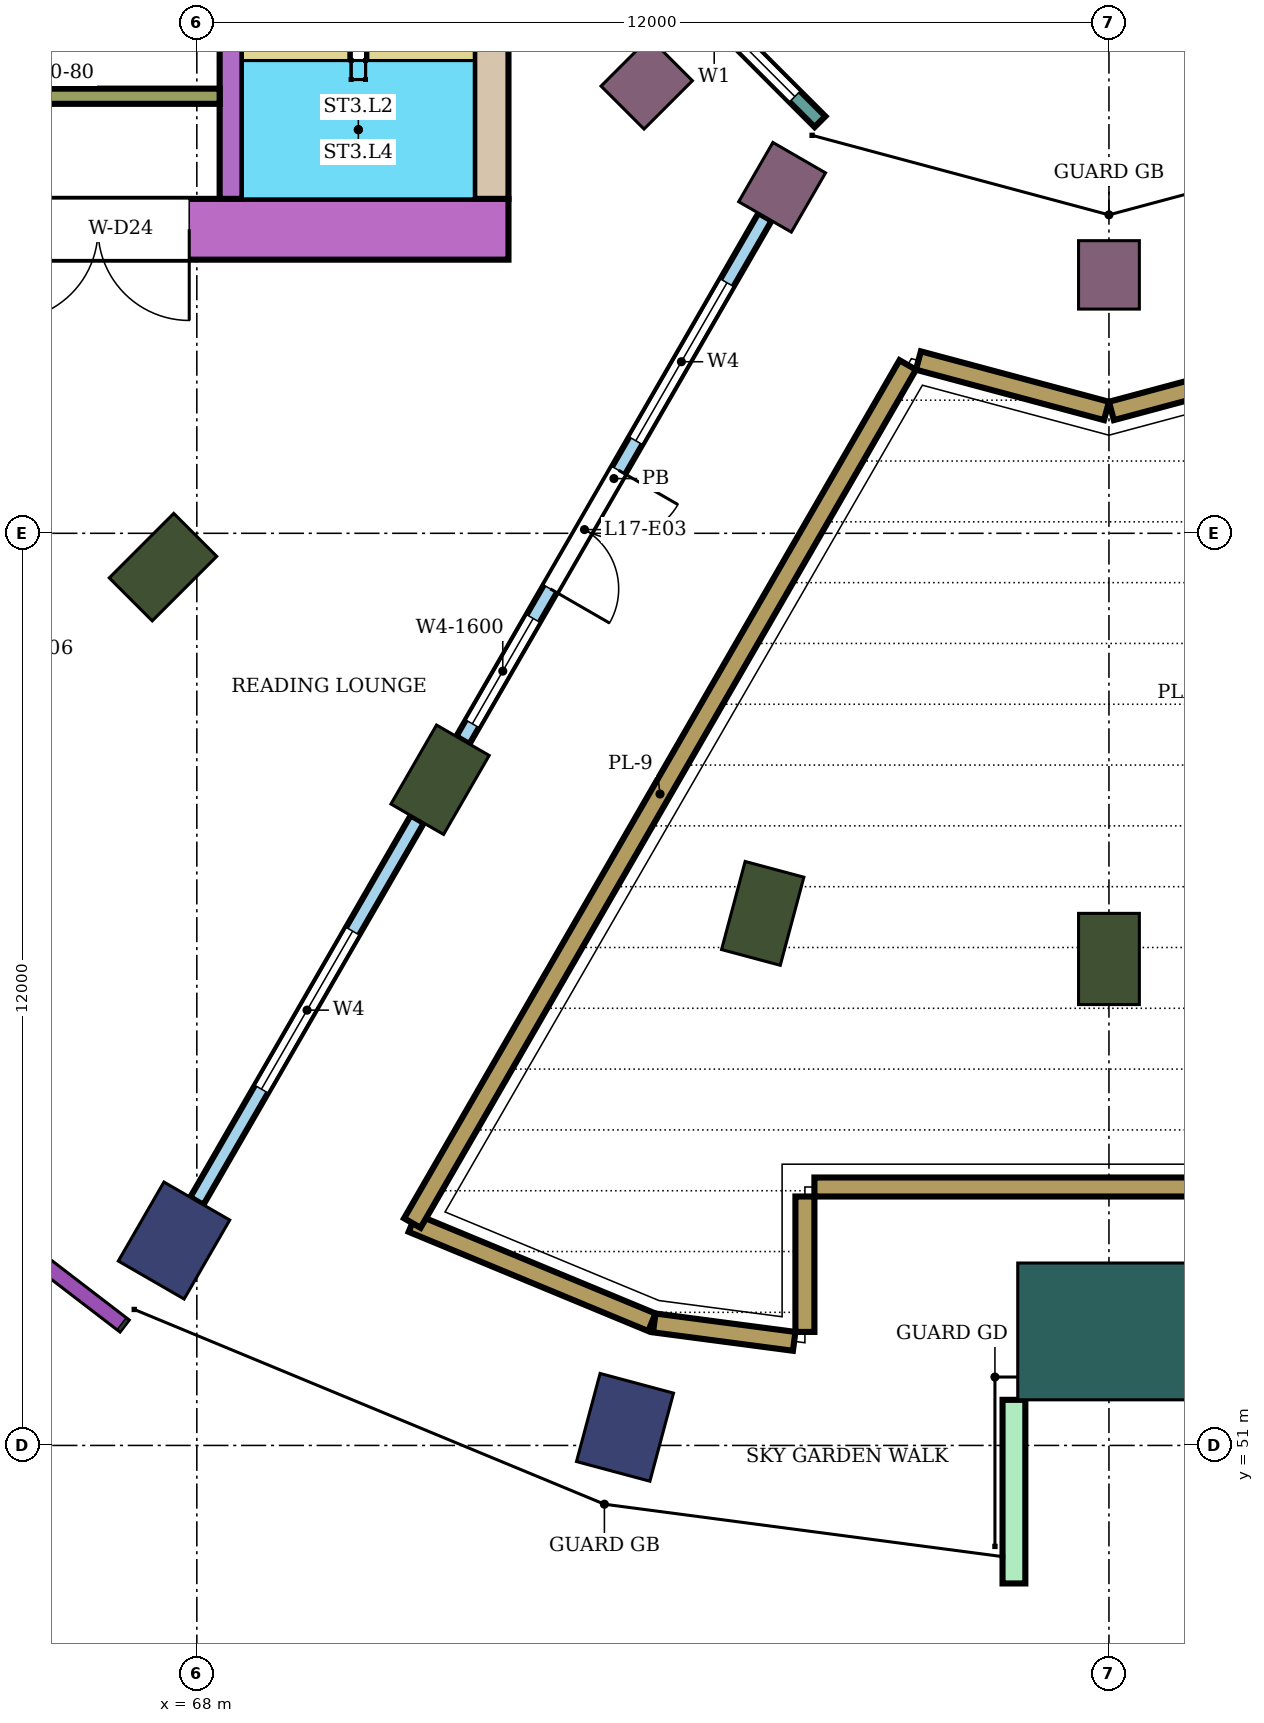
"""IFC4 building model, lengths in metres.
Left out: names, types, materials, properties, quantities, classifications, styles, units other than length and angle.
Written with IfcOpenShell. Run it as: python <this file> out.ifc"""

import sys

from ifc_helpers import new_model, si_unit, direction, frame, frame_2d, origin, origin_2d, place, context, subcontext, project, spatial, rectangle, extrude, element, fill, save


model = new_model("IFC4")
c1 = context("Model", 3, precision=1e-05, world=origin(), true_north=direction((0.0, 1.0)))
c2 = subcontext(c1, "Body", "Model", "MODEL_VIEW")
j1 = project(units=[si_unit("LENGTHUNIT", "METRE"), si_unit("PLANEANGLEUNIT", "RADIAN")], contexts=[c1])
p1 = place(None, origin())
s1 = spatial("IfcSite", under=j1, at=p1, CompositionType="ELEMENT")
p2 = place(p1, origin())
s2 = spatial("IfcBuilding", under=s1, at=p2, CompositionType="ELEMENT")
p3 = place(p2, frame((0.0, 0.0, 74.4)))
s3 = spatial("IfcBuildingStorey", under=s2, at=p3, CompositionType="ELEMENT", Elevation=74.4)
for number, where, z_axis, x_axis in (
    (1, (67.7, 53.696, 0.0), (0.0, 0.0, 1.0), (-0.5, -0.866, 0.0)),
    (2, (73.633, 51.238, 0.0), (0.0, 0.0, 1.0), (-0.259, -0.966, 0.0)),
):
    element("IfcColumn", number, at=place(p3, frame(where, z_axis=z_axis, x_axis=x_axis)), inside=s3, PredefinedType="COLUMN", context=c2, shape_type="SweptSolid", body=[
        extrude(rectangle(XDim=1.2, YDim=1.0, at=origin_2d()), origin(), (0.0, 0.0, 1.0), 8.0),
    ])
for number, where, z_axis, x_axis in (
    (3, (67.555, 62.555, 0.0), (0.0, 0.0, 1.0), (-0.707, -0.707, 0.0)),
    (4, (71.2, 59.758, 0.0), (0.0, 0.0, 1.0), (-0.5, -0.866, 0.0)),
    (5, (75.445, 58.0, 0.0), (0.0, 0.0, 1.0), (-0.259, -0.966, 0.0)),
    (6, (80.0, 57.4, 0.0), (0.0, 0.0, 1.0), (0.0, -1.0, 0.0)),
):
    element("IfcColumn", number, at=place(p3, frame(where, z_axis=z_axis, x_axis=x_axis)), inside=s3, PredefinedType="COLUMN", context=c2, shape_type="SweptSolid", body=[
        extrude(rectangle(XDim=1.2, YDim=0.8, at=origin_2d()), origin(), (0.0, 0.0, 1.0), 8.0),
    ])
for number, where, z_axis, x_axis in (
    (7, (73.919, 68.919, 0.0), (0.0, 0.0, 1.0), (-0.707, -0.707, 0.0)),
    (8, (75.7, 67.552, 0.0), (0.0, 0.0, 1.0), (-0.5, -0.866, 0.0)),
    (9, (80.0, 66.4, 0.0), (0.0, 0.0, 1.0), (0.0, -1.0, 0.0)),
):
    element("IfcColumn", number, at=place(p3, frame(where, z_axis=z_axis, x_axis=x_axis)), inside=s3, PredefinedType="COLUMN", context=c2, shape_type="SweptSolid", body=[
        extrude(rectangle(XDim=0.9, YDim=0.8, at=origin_2d()), origin(), (0.0, 0.0, 1.0), 8.0),
    ])
p4 = place(p3, frame((80.0, 52.5, 0.0), z_axis=(0.0, 0.0, 1.0), x_axis=(0.0, -1.0, 0.0)))
e10 = element("IfcColumn", 10, at=p4, inside=s3, PredefinedType="COLUMN", context=c2, shape_type="SweptSolid", body=[
    extrude(rectangle(XDim=1.8, YDim=2.4, at=origin_2d()), origin(), (0.0, 0.0, 1.0), 8.0),
])
p5 = place(p3, frame((72.1, 67.0, 0.0), z_axis=(0.0, 0.0, 1.0), x_axis=(-1.0, 0.0, 0.0)))
e11 = element("IfcWall", 11, at=p5, inside=s3, PredefinedType="SHEAR", context=c2, shape_type="SweptSolid", body=[
    extrude(rectangle(XDim=14.7, YDim=0.8, at=frame_2d((7.35, 0.0))), origin(), (0.0, 0.0, 1.0), 7.68),
])
p6 = place(p5, frame((4.2, 0.0, 0.0)))
e12 = element("IfcOpeningElement", 12, at=p6, cuts=e11, PredefinedType="OPENING", context=c2, shape_type="SweptSolid", body=[
    extrude(rectangle(XDim=2.4, YDim=2.4, at=frame_2d((1.2, 1.2))), frame((0.0, 0.41, 0.0), z_axis=(0.0, -1.0, 0.0), x_axis=(1.0, 0.0, 0.0)), (0.0, 0.0, 1.0), 0.82),
])
p7 = place(p3, frame((71.875, 75.0, 0.0), z_axis=(0.0, 0.0, 1.0), x_axis=(0.0, -1.0, 0.0)))
e13 = element("IfcWall", 13, at=p7, inside=s3, PredefinedType="SHEAR", context=c2, shape_type="SweptSolid", body=[
    extrude(rectangle(XDim=7.6, YDim=0.45, at=frame_2d((3.8, 0.0))), origin(), (0.0, 0.0, 1.0), 7.68),
])
p8 = place(p3, frame((68.45, 75.0, 0.0), z_axis=(0.0, 0.0, 1.0), x_axis=(0.0, -1.0, 0.0)))
e14 = element("IfcWall", 14, at=p8, inside=s3, PredefinedType="SHEAR", context=c2, shape_type="SweptSolid", body=[
    extrude(rectangle(XDim=7.6, YDim=0.3, at=frame_2d((3.8, 0.0))), origin(), (0.0, 0.0, 1.0), 7.68),
])
p9 = place(p8, frame((1.85, 0.0, 0.0)))
e15 = element("IfcOpeningElement", 15, at=p9, cuts=e14, PredefinedType="OPENING", context=c2, shape_type="SweptSolid", body=[
    extrude(rectangle(XDim=0.9, YDim=2.1, at=frame_2d((0.45, 1.05))), frame((0.0, 0.16, 0.0), z_axis=(0.0, -1.0, 0.0), x_axis=(1.0, 0.0, 0.0)), (0.0, 0.0, 1.0), 0.32),
])
p10 = place(p3, frame((68.3, 68.75, 0.0), z_axis=(0.0, 0.0, 1.0), x_axis=(-1.0, 0.0, 0.0)))
e16 = element("IfcWall", 16, at=p10, inside=s3, PredefinedType="SHEAR", context=c2, shape_type="SweptSolid", body=[
    extrude(rectangle(XDim=4.65, YDim=0.2, at=frame_2d((2.325, 0.0))), origin(), (0.0, 0.0, 1.0), 7.68),
])
p11 = place(p3, frame((78.75, 51.6, 0.0), z_axis=(0.0, 0.0, 1.0), x_axis=(0.0, -1.0, 0.0)))
e17 = element("IfcWall", 17, at=p11, inside=s3, PredefinedType="NOTDEFINED", context=c2, shape_type="SweptSolid", body=[
    extrude(rectangle(XDim=2.416, YDim=0.3, at=frame_2d((1.208, 0.0))), origin(), (0.0, 0.0, 1.0), 8.0),
])
p12 = place(p3, frame((73.415, 71.198, 0.0), z_axis=(0.0, 0.0, 1.0), x_axis=(0.707106781187, -0.707106781187, 0.0)))
e18 = element("IfcWall", 18, at=p12, inside=s3, PredefinedType="NOTDEFINED", context=c2, shape_type="SweptSolid", body=[
    extrude(rectangle(XDim=3.936, YDim=0.2, at=frame_2d((1.968, 0.0))), origin(), (0.0, 0.0, 1.0), 8.0),
])
p13 = place(p12, frame((0.468, 0.0, 0.9)))
e19 = element("IfcOpeningElement", 19, at=p13, cuts=e18, PredefinedType="OPENING", context=c2, shape_type="SweptSolid", body=[
    extrude(rectangle(XDim=3.0, YDim=2.3, at=frame_2d((1.5, 1.15))), frame((0.0, 0.11, 0.0), z_axis=(0.0, -1.0, 0.0), x_axis=(1.0, 0.0, 0.0)), (0.0, 0.0, 1.0), 0.22),
])
p14 = place(p3, frame((70.835, 53.926, 0.0), z_axis=(0.0, 0.0, 1.0), x_axis=(0.923871147788, -0.38270367425, 0.0)))
e20 = element("IfcWall", 20, at=p14, inside=s3, PredefinedType="USERDEFINED", context=c2, shape_type="SweptSolid", body=[
    extrude(rectangle(XDim=3.411, YDim=0.25, at=frame_2d((1.706, 0.0))), origin(), (0.0, 0.0, 1.0), 0.6),
])
p15 = place(p3, frame((74.018, 52.612, 0.0), z_axis=(0.0, 0.0, 1.0), x_axis=(0.991436829887, -0.130587182926, 0.0)))
e21 = element("IfcWall", 21, at=p15, inside=s3, PredefinedType="USERDEFINED", context=c2, shape_type="SweptSolid", body=[
    extrude(rectangle(XDim=1.856, YDim=0.25, at=frame_2d((0.928, 0.0))), origin(), (0.0, 0.0, 1.0), 0.6),
])
p16 = place(p3, frame((76.0, 52.493, 0.0), z_axis=(0.0, 0.0, 1.0), x_axis=(0.0, 1.0, 0.0)))
e22 = element("IfcWall", 22, at=p16, inside=s3, PredefinedType="USERDEFINED", context=c2, shape_type="SweptSolid", body=[
    extrude(rectangle(XDim=1.781, YDim=0.25, at=frame_2d((0.891, 0.0))), origin(), (0.0, 0.0, 1.0), 0.6),
])
p17 = place(p3, frame((76.125, 54.4, 0.0), z_axis=(0.0, 0.0, 1.0), x_axis=(1.0, 0.0, 0.0)))
e23 = element("IfcWall", 23, at=p17, inside=s3, PredefinedType="USERDEFINED", context=c2, shape_type="SweptSolid", body=[
    extrude(rectangle(XDim=7.75, YDim=0.25, at=frame_2d((3.875, 0.0))), origin(), (0.0, 0.0, 1.0), 0.6),
])
for number, where, z_axis, x_axis in (
    (24, (82.507, 65.273, 0.0), (0.0, 0.0, 1.0), (-0.966, -0.259, 0.0)),
    (25, (79.968, 64.61, 0.0), (0.0, 0.0, 1.0), (-0.966, 0.259, 0.0)),
):
    element("IfcWall", number, at=place(p3, frame(where, z_axis=z_axis, x_axis=x_axis)), inside=s3, PredefinedType="USERDEFINED", context=c2, shape_type="SweptSolid", body=[
        extrude(rectangle(XDim=2.562, YDim=0.25, at=frame_2d((1.281, 0.0))), origin(), (0.0, 0.0, 1.0), 0.6),
    ])
p18 = place(p3, frame((77.353, 65.215, 0.0), z_axis=(0.0, 0.0, 1.0), x_axis=(-0.499990498062, -0.866030889661, 0.0)))
e26 = element("IfcWall", 26, at=p18, inside=s3, PredefinedType="USERDEFINED", context=c2, shape_type="SweptSolid", body=[
    extrude(rectangle(XDim=13.035, YDim=0.25, at=frame_2d((6.518, 0.0))), origin(), (0.0, 0.0, 1.0), 0.6),
])
p19 = place(p3, frame((75.475, 67.162, 0.0), z_axis=(0.0, 0.0, 1.0), x_axis=(-0.50001663867, -0.86601579723, 0.0)))
e27 = element("IfcWall", 27, at=p19, inside=s3, PredefinedType="NOTDEFINED", context=c2, shape_type="SweptSolid", body=[
    extrude(rectangle(XDim=7.95, YDim=0.2, at=frame_2d((3.975, 0.0))), origin(), (0.0, 0.0, 1.0), 8.0),
])
p20 = place(p19, frame((1.0, 0.0, 0.3)))
e28 = element("IfcOpeningElement", 28, at=p20, cuts=e27, PredefinedType="OPENING", context=c2, shape_type="SweptSolid", body=[
    extrude(rectangle(XDim=2.4, YDim=3.6, at=frame_2d((1.2, 1.8))), frame((0.0, 0.11, 0.0), z_axis=(0.0, -1.0, 0.0), x_axis=(1.0, 0.0, 0.0)), (0.0, 0.0, 1.0), 0.22),
])
p21 = place(p19, frame((3.85, 0.0, 0.0)))
e29 = element("IfcOpeningElement", 29, at=p21, cuts=e27, PredefinedType="OPENING", context=c2, shape_type="SweptSolid", body=[
    extrude(rectangle(XDim=1.8, YDim=2.4, at=frame_2d((0.9, 1.2))), frame((0.0, 0.11, 0.0), z_axis=(0.0, -1.0, 0.0), x_axis=(1.0, 0.0, 0.0)), (0.0, 0.0, 1.0), 0.22),
])
p22 = place(p19, frame((6.1, 0.0, 0.3)))
e30 = element("IfcOpeningElement", 30, at=p22, cuts=e27, PredefinedType="OPENING", context=c2, shape_type="SweptSolid", body=[
    extrude(rectangle(XDim=1.6, YDim=3.6, at=frame_2d((0.8, 1.8))), frame((0.0, 0.11, 0.0), z_axis=(0.0, -1.0, 0.0), x_axis=(1.0, 0.0, 0.0)), (0.0, 0.0, 1.0), 0.22),
])
p23 = place(p3, frame((70.9, 59.238, 0.0), z_axis=(0.0, 0.0, 1.0), x_axis=(-0.499987231761, -0.866032775405, 0.0)))
e31 = element("IfcWall", 31, at=p23, inside=s3, PredefinedType="NOTDEFINED", context=c2, shape_type="SweptSolid", body=[
    extrude(rectangle(XDim=5.8, YDim=0.2, at=frame_2d((2.9, 0.0))), origin(), (0.0, 0.0, 1.0), 8.0),
])
p24 = place(p23, frame((1.7, 0.0, 0.3)))
e32 = element("IfcOpeningElement", 32, at=p24, cuts=e31, PredefinedType="OPENING", context=c2, shape_type="SweptSolid", body=[
    extrude(rectangle(XDim=2.4, YDim=3.6, at=frame_2d((1.2, 1.8))), frame((0.0, 0.11, 0.0), z_axis=(0.0, -1.0, 0.0), x_axis=(1.0, 0.0, 0.0)), (0.0, 0.0, 1.0), 0.22),
])
p25 = place(p13, origin())
e33 = element("IfcWindow", 33, at=p25, inside=s3, PartitioningType="SINGLE_PANEL", PredefinedType="WINDOW", context=c2, shape_type="SweptSolid", body=[
    extrude(rectangle(XDim=3.0, YDim=2.3, at=frame_2d((1.5, 1.15))), frame((0.0, 0.03, 0.0), z_axis=(0.0, -1.0, 0.0), x_axis=(1.0, 0.0, 0.0)), (0.0, 0.0, 1.0), 0.06),
])
fill(e19, e33)
p26 = place(p20, origin())
e34 = element("IfcWindow", 34, at=p26, inside=s3, PartitioningType="SINGLE_PANEL", PredefinedType="WINDOW", context=c2, shape_type="SweptSolid", body=[
    extrude(rectangle(XDim=2.4, YDim=3.6, at=frame_2d((1.2, 1.8))), frame((0.0, 0.03, 0.0), z_axis=(0.0, -1.0, 0.0), x_axis=(1.0, 0.0, 0.0)), (0.0, 0.0, 1.0), 0.06),
])
fill(e28, e34)
p27 = place(p21, origin())
e35 = element("IfcDoor", 35, at=p27, inside=s3, OperationType="DOUBLE_DOOR_SINGLE_SWING", PredefinedType="DOOR", context=c2, shape_type="SweptSolid", body=[
    extrude(rectangle(XDim=1.8, YDim=2.4, at=frame_2d((0.9, 1.2))), frame((0.0, 0.025, 0.0), z_axis=(0.0, -1.0, 0.0), x_axis=(1.0, 0.0, 0.0)), (0.0, 0.0, 1.0), 0.05),
])
fill(e29, e35)
p28 = place(p22, origin())
e36 = element("IfcWindow", 36, at=p28, inside=s3, PartitioningType="SINGLE_PANEL", PredefinedType="WINDOW", context=c2, shape_type="SweptSolid", body=[
    extrude(rectangle(XDim=1.6, YDim=3.6, at=frame_2d((0.8, 1.8))), frame((0.0, 0.03, 0.0), z_axis=(0.0, -1.0, 0.0), x_axis=(1.0, 0.0, 0.0)), (0.0, 0.0, 1.0), 0.06),
])
fill(e30, e36)
p29 = place(p24, origin())
e37 = element("IfcWindow", 37, at=p29, inside=s3, PartitioningType="SINGLE_PANEL", PredefinedType="WINDOW", context=c2, shape_type="SweptSolid", body=[
    extrude(rectangle(XDim=2.4, YDim=3.6, at=frame_2d((1.2, 1.8))), frame((0.0, 0.03, 0.0), z_axis=(0.0, -1.0, 0.0), x_axis=(1.0, 0.0, 0.0)), (0.0, 0.0, 1.0), 0.06),
])
fill(e32, e37)
p30 = place(p6, origin())
e38 = element("IfcDoor", 38, at=p30, inside=s3, OperationType="DOUBLE_DOOR_SINGLE_SWING", PredefinedType="DOOR", context=c2, shape_type="SweptSolid", body=[
    extrude(rectangle(XDim=2.4, YDim=2.4, at=frame_2d((1.2, 1.2))), frame((0.0, 0.025, 0.0), z_axis=(0.0, -1.0, 0.0), x_axis=(1.0, 0.0, 0.0)), (0.0, 0.0, 1.0), 0.05),
])
fill(e12, e38)
save(model, sys.argv[1])
